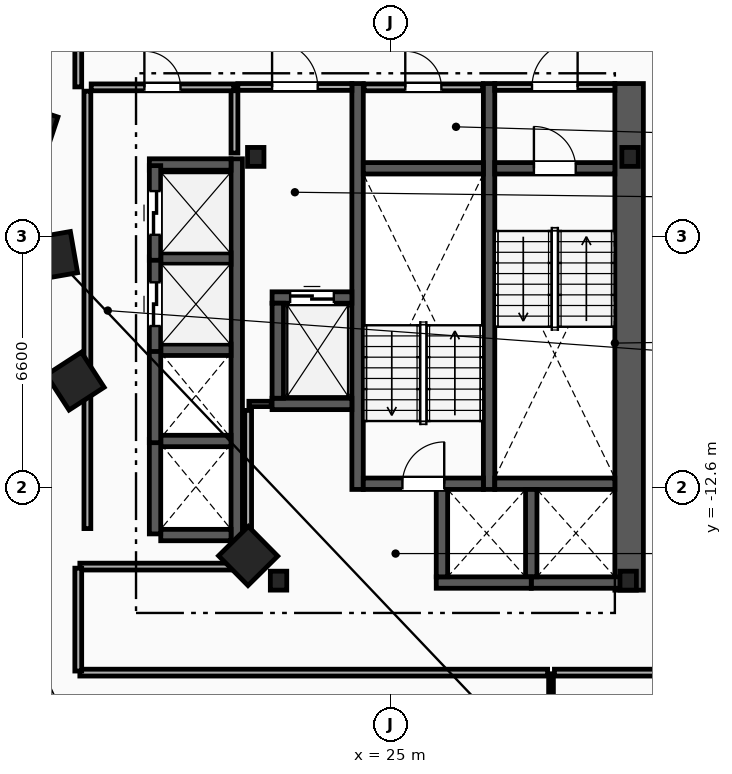
"""IFC4 building model, lengths in metres.
Left out: names, types, materials, properties, quantities, classifications, styles, units other than length and angle.
Written with IfcOpenShell. Run it as: python <this file> out.ifc"""

import sys

from ifc_helpers import new_model, si_unit, direction, frame, frame_2d, origin, origin_2d, place, context, subcontext, project, spatial, rectangle, i_section, extrude, element, fill, save


model = new_model("IFC4")
c1 = context("Model", 3, precision=1e-05, world=origin(), true_north=direction((0.0, 1.0)))
c2 = subcontext(c1, "Body", "Model", "MODEL_VIEW")
j1 = project(units=[si_unit("LENGTHUNIT", "METRE"), si_unit("PLANEANGLEUNIT", "RADIAN")], contexts=[c1])
p1 = place(None, origin())
s1 = spatial("IfcSite", under=j1, at=p1, CompositionType="ELEMENT")
p2 = place(p1, origin())
s2 = spatial("IfcBuilding", under=s1, at=p2, CompositionType="ELEMENT")
p3 = place(p2, frame((0.0, 0.0, 85.4)))
s3 = spatial("IfcBuildingStorey", under=s2, at=p3, CompositionType="ELEMENT", Elevation=85.4)
for number, where, z_axis, x_axis in (
    (1, (31.3, -3.9, 0.0), (0.0, 0.0, 1.0), (1.0, 0.0, 0.0)),
    (2, (21.45, -3.9, 0.0), (0.0, 0.0, 1.0), (1.0, 0.0, 0.0)),
    (3, (22.05, -15.05, 0.0), (0.0, 0.0, 1.0), (1.0, 0.0, 0.0)),
    (4, (31.25, -15.05, 0.0), (0.0, 0.0, 1.0), (1.0, 0.0, 0.0)),
):
    element("IfcColumn", number, at=place(p3, frame(where, z_axis=z_axis, x_axis=x_axis)), inside=s3, PredefinedType="COLUMN", context=c2, shape_type="SweptSolid", body=[
        extrude(i_section(OverallWidth=0.432, OverallDepth=0.498, WebThickness=0.056, FlangeThickness=0.089, FilletRadius=0.018, at=origin_2d()), origin(), (0.0, 0.0, 1.0), 3.6),
    ])
for number, where, z_axis, x_axis in (
    (5, (15.55, -3.2, 0.0), (0.0, 0.0, 1.0), (-0.315, -0.949, 0.0)),
    (6, (16.125, -6.5, 0.0), (0.0, 0.0, 1.0), (0.172, -0.985, 0.0)),
    (7, (16.7, -9.8, 0.0), (0.0, 0.0, 1.0), (0.544, -0.839, 0.0)),
    (8, (21.25, -14.4, 0.0), (0.0, 0.0, 1.0), (0.703, -0.711, 0.0)),
):
    element("IfcColumn", number, at=place(p3, frame(where, z_axis=z_axis, x_axis=x_axis)), inside=s3, PredefinedType="COLUMN", context=c2, shape_type="SweptSolid", body=[
        extrude(rectangle(XDim=1.1, YDim=1.1, at=origin_2d()), origin(), (0.0, 0.0, 1.0), 3.6),
    ])
p4 = place(p3, frame((31.275, -15.3, 0.0), z_axis=(0.0, 0.0, 1.0), x_axis=(0.0, 1.0, 0.0)))
e9 = element("IfcWall", 9, at=p4, inside=s3, PredefinedType="SHEAR", context=c2, shape_type="SweptSolid", body=[
    extrude(rectangle(XDim=13.33, YDim=0.75, at=frame_2d((6.665, 0.0))), origin(), (0.0, 0.0, 1.0), 3.3),
])
for number, where, z_axis, x_axis in (
    (10, (27.59, -12.65, 0.0), (0.0, 0.0, 1.0), (0.0, 1.0, 0.0)),
    (11, (24.13, -12.65, 0.0), (0.0, 0.0, 1.0), (0.0, 1.0, 0.0)),
):
    element("IfcWall", number, at=place(p3, frame(where, z_axis=z_axis, x_axis=x_axis)), inside=s3, PredefinedType="SHEAR", context=c2, shape_type="SweptSolid", body=[
        extrude(rectangle(XDim=10.68, YDim=0.3, at=frame_2d((5.34, 0.0))), origin(), (0.0, 0.0, 1.0), 3.3),
    ])
p5 = place(p3, frame((27.74, -4.2, 0.0), z_axis=(0.0, 0.0, 1.0), x_axis=(1.0, 0.0, 0.0)))
e12 = element("IfcWall", 12, at=p5, inside=s3, PredefinedType="SHEAR", context=c2, shape_type="SweptSolid", body=[
    extrude(rectangle(XDim=3.16, YDim=0.3, at=frame_2d((1.58, 0.0))), origin(), (0.0, 0.0, 1.0), 3.3),
])
p6 = place(p5, frame((1.03, 0.0, 0.0)))
e13 = element("IfcOpeningElement", 13, at=p6, cuts=e12, PredefinedType="OPENING", context=c2, shape_type="SweptSolid", body=[
    extrude(rectangle(XDim=1.1, YDim=2.15, at=frame_2d((0.55, 1.075))), frame((0.0, 0.16, 0.0), z_axis=(0.0, -1.0, 0.0), x_axis=(1.0, 0.0, 0.0)), (0.0, 0.0, 1.0), 0.32),
])
p7 = place(p3, frame((27.74, -12.5, 0.0), z_axis=(0.0, 0.0, 1.0), x_axis=(1.0, 0.0, 0.0)))
e14 = element("IfcWall", 14, at=p7, inside=s3, PredefinedType="SHEAR", context=c2, shape_type="SweptSolid", body=[
    extrude(rectangle(XDim=3.16, YDim=0.3, at=frame_2d((1.58, 0.0))), origin(), (0.0, 0.0, 1.0), 3.3),
])
p8 = place(p3, frame((24.28, -12.5, 0.0), z_axis=(0.0, 0.0, 1.0), x_axis=(1.0, 0.0, 0.0)))
e15 = element("IfcWall", 15, at=p8, inside=s3, PredefinedType="SHEAR", context=c2, shape_type="SweptSolid", body=[
    extrude(rectangle(XDim=3.16, YDim=0.3, at=frame_2d((1.58, 0.0))), origin(), (0.0, 0.0, 1.0), 3.3),
])
p9 = place(p8, frame((1.03, 0.0, 0.0)))
e16 = element("IfcOpeningElement", 16, at=p9, cuts=e15, PredefinedType="OPENING", context=c2, shape_type="SweptSolid", body=[
    extrude(rectangle(XDim=1.1, YDim=2.15, at=frame_2d((0.55, 1.075))), frame((0.0, 0.16, 0.0), z_axis=(0.0, -1.0, 0.0), x_axis=(1.0, 0.0, 0.0)), (0.0, 0.0, 1.0), 0.32),
])
p10 = place(p3, frame((24.28, -4.2, 0.0), z_axis=(0.0, 0.0, 1.0), x_axis=(1.0, 0.0, 0.0)))
e17 = element("IfcWall", 17, at=p10, inside=s3, PredefinedType="SHEAR", context=c2, shape_type="SweptSolid", body=[
    extrude(rectangle(XDim=3.16, YDim=0.3, at=frame_2d((1.58, 0.0))), origin(), (0.0, 0.0, 1.0), 3.3),
])
p11 = place(p3, frame((20.89, -3.8, 0.0), z_axis=(0.0, 0.0, 1.0), x_axis=(0.0, 1.0, 0.0)))
e18 = element("IfcWall", 18, at=p11, inside=s3, PredefinedType="PARTITIONING", context=c2, shape_type="SweptSolid", body=[
    extrude(rectangle(XDim=1.65, YDim=0.18, at=frame_2d((0.825, 0.0))), origin(), (0.0, 0.0, 1.0), 3.3),
])
p12 = place(p3, frame((20.98, -2.06, 0.0), z_axis=(0.0, 0.0, 1.0), x_axis=(1.0, 0.0, 0.0)))
e19 = element("IfcWall", 19, at=p12, inside=s3, PredefinedType="PARTITIONING", context=c2, shape_type="SweptSolid", body=[
    extrude(rectangle(XDim=3.0, YDim=0.18, at=frame_2d((1.5, 0.0))), origin(), (0.0, 0.0, 1.0), 3.3),
])
p13 = place(p12, frame((0.9, 0.0, 0.0)))
e20 = element("IfcOpeningElement", 20, at=p13, cuts=e19, PredefinedType="OPENING", context=c2, shape_type="SweptSolid", body=[
    extrude(rectangle(XDim=1.2, YDim=2.15, at=frame_2d((0.6, 1.075))), frame((0.0, 0.1, 0.0), z_axis=(0.0, -1.0, 0.0), x_axis=(1.0, 0.0, 0.0)), (0.0, 0.0, 1.0), 0.2),
])
p14 = place(p3, frame((27.74, -2.06, 0.0), z_axis=(0.0, 0.0, 1.0), x_axis=(1.0, 0.0, 0.0)))
e21 = element("IfcWall", 21, at=p14, inside=s3, PredefinedType="PARTITIONING", context=c2, shape_type="SweptSolid", body=[
    extrude(rectangle(XDim=3.16, YDim=0.18, at=frame_2d((1.58, 0.0))), origin(), (0.0, 0.0, 1.0), 3.3),
])
p15 = place(p14, frame((0.98, 0.0, 0.0)))
e22 = element("IfcOpeningElement", 22, at=p15, cuts=e21, PredefinedType="OPENING", context=c2, shape_type="SweptSolid", body=[
    extrude(rectangle(XDim=1.2, YDim=2.15, at=frame_2d((0.6, 1.075))), frame((0.0, 0.1, 0.0), z_axis=(0.0, -1.0, 0.0), x_axis=(1.0, 0.0, 0.0)), (0.0, 0.0, 1.0), 0.2),
])
p16 = place(p3, frame((21.88, -7.6, 0.0), z_axis=(0.0, 0.0, 1.0), x_axis=(1.0, 0.0, 0.0)))
e23 = element("IfcWall", 23, at=p16, inside=s3, PredefinedType="SHEAR", context=c2, shape_type="SweptSolid", body=[
    extrude(rectangle(XDim=2.1, YDim=0.3, at=frame_2d((1.05, 0.0))), origin(), (0.0, 0.0, 1.0), 3.3),
])
p17 = place(p16, frame((0.475, 0.0, 0.0)))
e24 = element("IfcOpeningElement", 24, at=p17, cuts=e23, PredefinedType="OPENING", context=c2, shape_type="SweptSolid", body=[
    extrude(rectangle(XDim=1.15, YDim=2.2, at=frame_2d((0.575, 1.1))), frame((0.0, 0.16, 0.0), z_axis=(0.0, -1.0, 0.0), x_axis=(1.0, 0.0, 0.0)), (0.0, 0.0, 1.0), 0.32),
])
p18 = place(p3, frame((21.88, -10.4, 0.0), z_axis=(0.0, 0.0, 1.0), x_axis=(1.0, 0.0, 0.0)))
e25 = element("IfcWall", 25, at=p18, inside=s3, PredefinedType="SHEAR", context=c2, shape_type="SweptSolid", body=[
    extrude(rectangle(XDim=2.1, YDim=0.3, at=frame_2d((1.05, 0.0))), origin(), (0.0, 0.0, 1.0), 3.3),
])
for number, where, z_axis, x_axis in (
    (26, (22.03, -10.25, 0.0), (0.0, 0.0, 1.0), (0.0, 1.0, 0.0)),
    (27, (28.7, -15.1, 0.0), (0.0, 0.0, 1.0), (1.0, 0.0, 0.0)),
):
    element("IfcWall", number, at=place(p3, frame(where, z_axis=z_axis, x_axis=x_axis)), inside=s3, PredefinedType="SHEAR", context=c2, shape_type="SweptSolid", body=[
        extrude(rectangle(XDim=2.5, YDim=0.3, at=frame_2d((1.25, 0.0))), origin(), (0.0, 0.0, 1.0), 3.3),
    ])
p19 = place(p3, frame((28.7, -14.95, 0.0), z_axis=(0.0, 0.0, 1.0), x_axis=(0.0, 1.0, 0.0)))
e28 = element("IfcWall", 28, at=p19, inside=s3, PredefinedType="SHEAR", context=c2, shape_type="SweptSolid", body=[
    extrude(rectangle(XDim=2.3, YDim=0.3, at=frame_2d((1.15, 0.0))), origin(), (0.0, 0.0, 1.0), 3.3),
])
p20 = place(p3, frame((26.2, -15.1, 0.0), z_axis=(0.0, 0.0, 1.0), x_axis=(1.0, 0.0, 0.0)))
e29 = element("IfcWall", 29, at=p20, inside=s3, PredefinedType="SHEAR", context=c2, shape_type="SweptSolid", body=[
    extrude(rectangle(XDim=2.5, YDim=0.3, at=frame_2d((1.25, 0.0))), origin(), (0.0, 0.0, 1.0), 3.3),
])
p21 = place(p3, frame((26.35, -14.95, 0.0), z_axis=(0.0, 0.0, 1.0), x_axis=(0.0, 1.0, 0.0)))
e30 = element("IfcWall", 30, at=p21, inside=s3, PredefinedType="SHEAR", context=c2, shape_type="SweptSolid", body=[
    extrude(rectangle(XDim=2.3, YDim=0.3, at=frame_2d((1.15, 0.0))), origin(), (0.0, 0.0, 1.0), 3.3),
])
p22 = place(p3, frame((20.95, -14.0, 0.0), z_axis=(0.0, 0.0, 1.0), x_axis=(0.0, 1.0, 0.0)))
e31 = element("IfcWall", 31, at=p22, inside=s3, PredefinedType="SHEAR", context=c2, shape_type="SweptSolid", body=[
    extrude(rectangle(XDim=10.05, YDim=0.3, at=frame_2d((5.025, 0.0))), origin(), (0.0, 0.0, 1.0), 3.3),
])
p23 = place(p3, frame((18.95, -13.85, 0.0), z_axis=(0.0, 0.0, 1.0), x_axis=(1.0, 0.0, 0.0)))
e32 = element("IfcWall", 32, at=p23, inside=s3, PredefinedType="SHEAR", context=c2, shape_type="SweptSolid", body=[
    extrude(rectangle(XDim=1.85, YDim=0.3, at=frame_2d((0.925, 0.0))), origin(), (0.0, 0.0, 1.0), 3.3),
])
p24 = place(p3, frame((18.65, -4.1, 0.0), z_axis=(0.0, 0.0, 1.0), x_axis=(1.0, 0.0, 0.0)))
e33 = element("IfcWall", 33, at=p24, inside=s3, PredefinedType="SHEAR", context=c2, shape_type="SweptSolid", body=[
    extrude(rectangle(XDim=2.15, YDim=0.3, at=frame_2d((1.075, 0.0))), origin(), (0.0, 0.0, 1.0), 3.3),
])
for number, where, z_axis, x_axis in (
    (34, (18.95, -11.375, 0.0), (0.0, 0.0, 1.0), (1.0, 0.0, 0.0)),
    (35, (18.95, -8.975, 0.0), (0.0, 0.0, 1.0), (1.0, 0.0, 0.0)),
    (36, (18.95, -6.575, 0.0), (0.0, 0.0, 1.0), (1.0, 0.0, 0.0)),
):
    element("IfcWall", number, at=place(p3, frame(where, z_axis=z_axis, x_axis=x_axis)), inside=s3, PredefinedType="SHEAR", context=c2, shape_type="SweptSolid", body=[
        extrude(rectangle(XDim=1.85, YDim=0.3, at=frame_2d((0.925, 0.0))), origin(), (0.0, 0.0, 1.0), 3.3),
    ])
for number, where, z_axis, x_axis in (
    (37, (18.8, -13.82, 0.0), (0.0, 0.0, 1.0), (0.0, 1.0, 0.0)),
    (38, (18.8, -11.42, 0.0), (0.0, 0.0, 1.0), (0.0, 1.0, 0.0)),
):
    element("IfcWall", number, at=place(p3, frame(where, z_axis=z_axis, x_axis=x_axis)), inside=s3, PredefinedType="SHEAR", context=c2, shape_type="SweptSolid", body=[
        extrude(rectangle(XDim=2.49, YDim=0.3, at=frame_2d((1.245, 0.0))), origin(), (0.0, 0.0, 1.0), 3.3),
    ])
p25 = place(p3, frame((18.8, -9.02, 0.0), z_axis=(0.0, 0.0, 1.0), x_axis=(0.0, 1.0, 0.0)))
e39 = element("IfcWall", 39, at=p25, inside=s3, PredefinedType="SHEAR", context=c2, shape_type="SweptSolid", body=[
    extrude(rectangle(XDim=2.49, YDim=0.3, at=frame_2d((1.245, 0.0))), origin(), (0.0, 0.0, 1.0), 3.3),
])
p26 = place(p25, frame((0.67, 0.0, 0.0)))
e40 = element("IfcOpeningElement", 40, at=p26, cuts=e39, PredefinedType="OPENING", context=c2, shape_type="SweptSolid", body=[
    extrude(rectangle(XDim=1.15, YDim=2.2, at=frame_2d((0.575, 1.1))), frame((0.0, 0.16, 0.0), z_axis=(0.0, -1.0, 0.0), x_axis=(1.0, 0.0, 0.0)), (0.0, 0.0, 1.0), 0.32),
])
p27 = place(p3, frame((18.8, -6.62, 0.0), z_axis=(0.0, 0.0, 1.0), x_axis=(0.0, 1.0, 0.0)))
e41 = element("IfcWall", 41, at=p27, inside=s3, PredefinedType="SHEAR", context=c2, shape_type="SweptSolid", body=[
    extrude(rectangle(XDim=2.49, YDim=0.3, at=frame_2d((1.245, 0.0))), origin(), (0.0, 0.0, 1.0), 3.3),
])
p28 = place(p27, frame((0.67, 0.0, 0.0)))
e42 = element("IfcOpeningElement", 42, at=p28, cuts=e41, PredefinedType="OPENING", context=c2, shape_type="SweptSolid", body=[
    extrude(rectangle(XDim=1.15, YDim=2.2, at=frame_2d((0.575, 1.1))), frame((0.0, 0.16, 0.0), z_axis=(0.0, -1.0, 0.0), x_axis=(1.0, 0.0, 0.0)), (0.0, 0.0, 1.0), 0.32),
])
p29 = place(p3, frame((17.02, -13.68, 0.0), z_axis=(0.0, 0.0, 1.0), x_axis=(0.0, 1.0, 0.0)))
e43 = element("IfcWall", 43, at=p29, inside=s3, PredefinedType="PARTITIONING", context=c2, shape_type="SweptSolid", body=[
    extrude(rectangle(XDim=11.51, YDim=0.18, at=frame_2d((5.755, 0.0))), origin(), (0.0, 0.0, 1.0), 3.3),
])
p30 = place(p3, frame((17.12, -2.07, 0.0), z_axis=(0.0, 0.0, 1.0), x_axis=(1.0, 0.0, 0.0)))
e44 = element("IfcWall", 44, at=p30, inside=s3, PredefinedType="PARTITIONING", context=c2, shape_type="SweptSolid", body=[
    extrude(rectangle(XDim=3.75, YDim=0.18, at=frame_2d((1.875, 0.0))), origin(), (0.0, 0.0, 1.0), 3.3),
])
p31 = place(p30, frame((1.4, 0.0, 0.0)))
e45 = element("IfcOpeningElement", 45, at=p31, cuts=e44, PredefinedType="OPENING", context=c2, shape_type="SweptSolid", body=[
    extrude(rectangle(XDim=0.95, YDim=2.1, at=frame_2d((0.475, 1.05))), frame((0.0, 0.1, 0.0), z_axis=(0.0, -1.0, 0.0), x_axis=(1.0, 0.0, 0.0)), (0.0, 0.0, 1.0), 0.2),
])
p32 = place(p3, frame((21.27, -10.4, 0.0), z_axis=(0.0, 0.0, 1.0), x_axis=(1.0, 0.0, 0.0)))
e46 = element("IfcWall", 46, at=p32, inside=s3, PredefinedType="PARTITIONING", context=c2, shape_type="SweptSolid", body=[
    extrude(rectangle(XDim=0.59, YDim=0.14, at=frame_2d((0.295, 0.0))), origin(), (0.0, 0.0, 1.0), 3.3),
])
p33 = place(p3, frame((21.25, -14.93, 0.0), z_axis=(0.0, 0.0, 1.0), x_axis=(0.0, 1.0, 0.0)))
e47 = element("IfcWall", 47, at=p33, inside=s3, PredefinedType="PARTITIONING", context=c2, shape_type="SweptSolid", body=[
    extrude(rectangle(XDim=4.36, YDim=0.18, at=frame_2d((2.18, 0.0))), origin(), (0.0, 0.0, 1.0), 3.3),
])
p34 = place(p3, frame((24.3, -2.07, 0.0), z_axis=(0.0, 0.0, 1.0), x_axis=(1.0, 0.0, 0.0)))
e48 = element("IfcWall", 48, at=p34, inside=s3, PredefinedType="PARTITIONING", context=c2, shape_type="SweptSolid", body=[
    extrude(rectangle(XDim=3.12, YDim=0.18, at=frame_2d((1.56, 0.0))), origin(), (0.0, 0.0, 1.0), 3.3),
])
p35 = place(p34, frame((1.085, 0.0, 0.0)))
e49 = element("IfcOpeningElement", 49, at=p35, cuts=e48, PredefinedType="OPENING", context=c2, shape_type="SweptSolid", body=[
    extrude(rectangle(XDim=0.95, YDim=2.1, at=frame_2d((0.475, 1.05))), frame((0.0, 0.1, 0.0), z_axis=(0.0, -1.0, 0.0), x_axis=(1.0, 0.0, 0.0)), (0.0, 0.0, 1.0), 0.2),
])
p36 = place(p3, frame((29.22, -25.966, 0.0), z_axis=(0.0, 0.0, 1.0), x_axis=(0.0, 1.0, 0.0)))
e50 = element("IfcWall", 50, at=p36, inside=s3, PredefinedType="PARTITIONING", context=c2, shape_type="SweptSolid", body=[
    extrude(rectangle(XDim=8.466, YDim=0.125, at=frame_2d((4.233, 0.0))), origin(), (0.0, 0.0, 1.0), 3.3),
])
p37 = place(p3, frame((29.31, -17.47, 0.0), z_axis=(0.0, 0.0, 1.0), x_axis=(1.0, 0.0, 0.0)))
e51 = element("IfcWall", 51, at=p37, inside=s3, PredefinedType="PARTITIONING", context=c2, shape_type="SweptSolid", body=[
    extrude(rectangle(XDim=4.318, YDim=0.18, at=frame_2d((2.159, 0.0))), origin(), (0.0, 0.0, 1.0), 3.3),
])
p38 = place(p3, frame((16.822, -17.47, 0.0), z_axis=(0.0, 0.0, 1.0), x_axis=(1.0, 0.0, 0.0)))
e52 = element("IfcWall", 52, at=p38, inside=s3, PredefinedType="PARTITIONING", context=c2, shape_type="SweptSolid", body=[
    extrude(rectangle(XDim=12.308, YDim=0.18, at=frame_2d((6.154, 0.0))), origin(), (0.0, 0.0, 1.0), 3.3),
])
p39 = place(p3, frame((21.178, -14.68, 0.0), z_axis=(0.0, 0.0, 1.0), x_axis=(-1.0, 0.0, 0.0)))
e53 = element("IfcWall", 53, at=p39, inside=s3, PredefinedType="PARTITIONING", context=c2, shape_type="SweptSolid", body=[
    extrude(rectangle(XDim=4.357, YDim=0.18, at=frame_2d((2.178, 0.0))), origin(), (0.0, 0.0, 1.0), 3.3),
])
p40 = place(p3, frame((16.78, -14.721, 0.0), z_axis=(0.0, 0.0, 1.0), x_axis=(0.0, -1.0, 0.0)))
e54 = element("IfcWall", 54, at=p40, inside=s3, PredefinedType="PARTITIONING", context=c2, shape_type="SweptSolid", body=[
    extrude(rectangle(XDim=2.707, YDim=0.18, at=frame_2d((1.354, 0.0))), origin(), (0.0, 0.0, 1.0), 3.3),
])
p41 = place(p3, frame((16.78, 0.329, 0.0), z_axis=(0.0, 0.0, 1.0), x_axis=(0.0, -1.0, 0.0)))
e55 = element("IfcWall", 55, at=p41, inside=s3, PredefinedType="PARTITIONING", context=c2, shape_type="SweptSolid", body=[
    extrude(rectangle(XDim=2.387, YDim=0.18, at=frame_2d((1.194, 0.0))), origin(), (0.0, 0.0, 1.0), 3.3),
])
p42 = place(p6, origin())
e56 = element("IfcDoor", 56, at=p42, inside=s3, OperationType="SINGLE_SWING_LEFT", PredefinedType="DOOR", context=c2, shape_type="SweptSolid", body=[
    extrude(rectangle(XDim=1.1, YDim=2.15, at=frame_2d((0.55, 1.075))), frame((0.0, 0.025, 0.0), z_axis=(0.0, -1.0, 0.0), x_axis=(1.0, 0.0, 0.0)), (0.0, 0.0, 1.0), 0.05),
])
fill(e13, e56)
p43 = place(p9, origin())
e57 = element("IfcDoor", 57, at=p43, inside=s3, OperationType="SINGLE_SWING_RIGHT", PredefinedType="DOOR", context=c2, shape_type="SweptSolid", body=[
    extrude(rectangle(XDim=1.1, YDim=2.15, at=frame_2d((0.55, 1.075))), frame((0.0, 0.025, 0.0), z_axis=(0.0, -1.0, 0.0), x_axis=(1.0, 0.0, 0.0)), (0.0, 0.0, 1.0), 0.05),
])
fill(e16, e57)
p44 = place(p13, origin())
e58 = element("IfcDoor", 58, at=p44, inside=s3, OperationType="SINGLE_SWING_LEFT", PredefinedType="DOOR", context=c2, shape_type="SweptSolid", body=[
    extrude(rectangle(XDim=1.2, YDim=2.15, at=frame_2d((0.6, 1.075))), frame((0.0, 0.025, 0.0), z_axis=(0.0, -1.0, 0.0), x_axis=(1.0, 0.0, 0.0)), (0.0, 0.0, 1.0), 0.05),
])
fill(e20, e58)
p45 = place(p15, origin())
e59 = element("IfcDoor", 59, at=p45, inside=s3, OperationType="SINGLE_SWING_RIGHT", PredefinedType="DOOR", context=c2, shape_type="SweptSolid", body=[
    extrude(rectangle(XDim=1.2, YDim=2.15, at=frame_2d((0.6, 1.075))), frame((0.0, 0.025, 0.0), z_axis=(0.0, -1.0, 0.0), x_axis=(1.0, 0.0, 0.0)), (0.0, 0.0, 1.0), 0.05),
])
fill(e22, e59)
p46 = place(p17, origin())
e60 = element("IfcDoor", 60, at=p46, inside=s3, OperationType="SLIDING_TO_LEFT", PredefinedType="TRAPDOOR", context=c2, shape_type="SweptSolid", body=[
    extrude(rectangle(XDim=1.15, YDim=2.2, at=frame_2d((0.575, 1.1))), frame((0.0, 0.025, 0.0), z_axis=(0.0, -1.0, 0.0), x_axis=(1.0, 0.0, 0.0)), (0.0, 0.0, 1.0), 0.05),
])
fill(e24, e60)
p47 = place(p26, origin())
e61 = element("IfcDoor", 61, at=p47, inside=s3, OperationType="SLIDING_TO_LEFT", PredefinedType="TRAPDOOR", context=c2, shape_type="SweptSolid", body=[
    extrude(rectangle(XDim=1.15, YDim=2.2, at=frame_2d((0.575, 1.1))), frame((0.0, 0.025, 0.0), z_axis=(0.0, -1.0, 0.0), x_axis=(1.0, 0.0, 0.0)), (0.0, 0.0, 1.0), 0.05),
])
fill(e40, e61)
p48 = place(p28, origin())
e62 = element("IfcDoor", 62, at=p48, inside=s3, OperationType="SLIDING_TO_LEFT", PredefinedType="TRAPDOOR", context=c2, shape_type="SweptSolid", body=[
    extrude(rectangle(XDim=1.15, YDim=2.2, at=frame_2d((0.575, 1.1))), frame((0.0, 0.025, 0.0), z_axis=(0.0, -1.0, 0.0), x_axis=(1.0, 0.0, 0.0)), (0.0, 0.0, 1.0), 0.05),
])
fill(e42, e62)
p49 = place(p31, origin())
e63 = element("IfcDoor", 63, at=p49, inside=s3, OperationType="SINGLE_SWING_LEFT", PredefinedType="DOOR", context=c2, shape_type="SweptSolid", body=[
    extrude(rectangle(XDim=0.95, YDim=2.1, at=frame_2d((0.475, 1.05))), frame((0.0, 0.025, 0.0), z_axis=(0.0, -1.0, 0.0), x_axis=(1.0, 0.0, 0.0)), (0.0, 0.0, 1.0), 0.05),
])
fill(e45, e63)
p50 = place(p35, origin())
e64 = element("IfcDoor", 64, at=p50, inside=s3, OperationType="SINGLE_SWING_LEFT", PredefinedType="DOOR", context=c2, shape_type="SweptSolid", body=[
    extrude(rectangle(XDim=0.95, YDim=2.1, at=frame_2d((0.475, 1.05))), frame((0.0, 0.025, 0.0), z_axis=(0.0, -1.0, 0.0), x_axis=(1.0, 0.0, 0.0)), (0.0, 0.0, 1.0), 0.05),
])
fill(e49, e64)
save(model, sys.argv[1])
